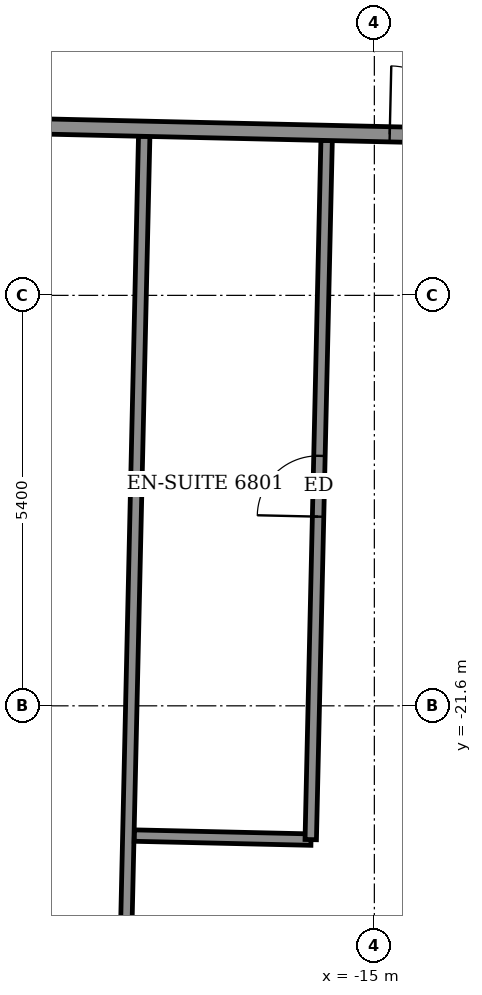
"""IFC4 building model, lengths in metres.
Left out: names, types, materials, properties, quantities, classifications, styles, units other than length and angle.
Written with IfcOpenShell. Run it as: python <this file> out.ifc"""

import sys

from ifc_helpers import new_model, si_unit, direction, frame, frame_2d, origin, place, context, subcontext, project, spatial, rectangle, extrude, element, fill, save


model = new_model("IFC4")
c1 = context("Model", 3, precision=1e-05, world=origin(), true_north=direction((0.0, 1.0)))
c2 = subcontext(c1, "Body", "Model", "MODEL_VIEW")
j1 = project(units=[si_unit("LENGTHUNIT", "METRE"), si_unit("PLANEANGLEUNIT", "RADIAN")], contexts=[c1])
p1 = place(None, origin())
s1 = spatial("IfcSite", under=j1, at=p1, CompositionType="ELEMENT")
p2 = place(p1, origin())
s2 = spatial("IfcBuilding", under=s1, at=p2, CompositionType="ELEMENT")
p3 = place(p2, frame((0.0, 0.0, 268.1)))
s3 = spatial("IfcBuildingStorey", under=s2, at=p3, CompositionType="ELEMENT", Elevation=268.1)
p4 = place(p3, frame((-18.309, -26.505, 0.0), z_axis=(0.0, 0.0, 1.0), x_axis=(0.022661475803, 0.999743195783, 0.0)))
e1 = element("IfcWall", 1, at=p4, inside=s3, PredefinedType="PARTITIONING", context=c2, shape_type="SweptSolid", body=[
    extrude(rectangle(XDim=12.4, YDim=0.15, at=frame_2d((6.2, 0.0))), origin(), (0.0, 0.0, 1.0), 2.55),
])
p5 = place(p3, frame((-18.157, -23.307, 0.0), z_axis=(0.0, 0.0, 1.0), x_axis=(0.999737862264, -0.022895561926, 0.0)))
e2 = element("IfcWall", 2, at=p5, inside=s3, PredefinedType="PARTITIONING", context=c2, shape_type="SweptSolid", body=[
    extrude(rectangle(XDim=2.324, YDim=0.15, at=frame_2d((1.162, 0.0))), origin(), (0.0, 0.0, 1.0), 3.05),
])
p6 = place(p3, frame((-15.837, -23.36, 0.0), z_axis=(0.0, 0.0, 1.0), x_axis=(0.02271477479, 0.999741986218, 0.0)))
e3 = element("IfcWall", 3, at=p6, inside=s3, PredefinedType="PARTITIONING", context=c2, shape_type="SweptSolid", body=[
    extrude(rectangle(XDim=9.2, YDim=0.15, at=frame_2d((4.6, 0.0))), origin(), (0.0, 0.0, 1.0), 3.05),
])
p7 = place(p6, frame((4.25, 0.0, 0.0)))
e4 = element("IfcOpeningElement", 4, at=p7, cuts=e3, PredefinedType="OPENING", context=c2, shape_type="SweptSolid", body=[
    extrude(rectangle(XDim=0.8, YDim=2.1, at=frame_2d((0.4, 1.05))), frame((0.0, 0.085, 0.0), z_axis=(0.0, -1.0, 0.0), x_axis=(1.0, 0.0, 0.0)), (0.0, 0.0, 1.0), 0.17),
])
p8 = place(p3, frame((-25.12, -13.847, 0.0), z_axis=(0.0, 0.0, 1.0), x_axis=(0.999742852445, -0.022676617578, 0.0)))
e5 = element("IfcWall", 5, at=p8, inside=s3, PredefinedType="PARTITIONING", context=c2, shape_type="SweptSolid", body=[
    extrude(rectangle(XDim=52.873, YDim=0.2, at=frame_2d((26.437, 0.0))), origin(), (0.0, 0.0, 1.0), 3.05),
])
p9 = place(p8, frame((2.43, 0.0, 0.0)))
e6 = element("IfcOpeningElement", 6, at=p9, cuts=e5, PredefinedType="OPENING", context=c2, shape_type="SweptSolid", body=[
    extrude(rectangle(XDim=1.0, YDim=2.1, at=frame_2d((0.5, 1.05))), frame((0.0, 0.11, 0.0), z_axis=(0.0, -1.0, 0.0), x_axis=(1.0, 0.0, 0.0)), (0.0, 0.0, 1.0), 0.22),
])
p10 = place(p8, frame((10.325, 0.0, 0.0)))
e7 = element("IfcOpeningElement", 7, at=p10, cuts=e5, PredefinedType="OPENING", context=c2, shape_type="SweptSolid", body=[
    extrude(rectangle(XDim=0.9, YDim=2.1, at=frame_2d((0.45, 1.05))), frame((0.0, 0.11, 0.0), z_axis=(0.0, -1.0, 0.0), x_axis=(1.0, 0.0, 0.0)), (0.0, 0.0, 1.0), 0.22),
])
p11 = place(p8, frame((12.575, 0.0, 0.0)))
e8 = element("IfcOpeningElement", 8, at=p11, cuts=e5, PredefinedType="OPENING", context=c2, shape_type="SweptSolid", body=[
    extrude(rectangle(XDim=0.9, YDim=2.1, at=frame_2d((0.45, 1.05))), frame((0.0, 0.11, 0.0), z_axis=(0.0, -1.0, 0.0), x_axis=(1.0, 0.0, 0.0)), (0.0, 0.0, 1.0), 0.22),
])
p12 = place(p8, frame((19.45, 0.0, 0.0)))
e9 = element("IfcOpeningElement", 9, at=p12, cuts=e5, PredefinedType="OPENING", context=c2, shape_type="SweptSolid", body=[
    extrude(rectangle(XDim=0.9, YDim=2.1, at=frame_2d((0.45, 1.05))), frame((0.0, 0.11, 0.0), z_axis=(0.0, -1.0, 0.0), x_axis=(1.0, 0.0, 0.0)), (0.0, 0.0, 1.0), 0.22),
])
p13 = place(p8, frame((21.625, 0.0, 0.0)))
e10 = element("IfcOpeningElement", 10, at=p13, cuts=e5, PredefinedType="OPENING", context=c2, shape_type="SweptSolid", body=[
    extrude(rectangle(XDim=0.9, YDim=2.1, at=frame_2d((0.45, 1.05))), frame((0.0, 0.11, 0.0), z_axis=(0.0, -1.0, 0.0), x_axis=(1.0, 0.0, 0.0)), (0.0, 0.0, 1.0), 0.22),
])
p14 = place(p8, frame((28.575, 0.0, 0.0)))
e11 = element("IfcOpeningElement", 11, at=p14, cuts=e5, PredefinedType="OPENING", context=c2, shape_type="SweptSolid", body=[
    extrude(rectangle(XDim=0.9, YDim=2.1, at=frame_2d((0.45, 1.05))), frame((0.0, 0.11, 0.0), z_axis=(0.0, -1.0, 0.0), x_axis=(1.0, 0.0, 0.0)), (0.0, 0.0, 1.0), 0.22),
])
p15 = place(p8, frame((30.875, 0.0, 0.0)))
e12 = element("IfcOpeningElement", 12, at=p15, cuts=e5, PredefinedType="OPENING", context=c2, shape_type="SweptSolid", body=[
    extrude(rectangle(XDim=0.9, YDim=2.1, at=frame_2d((0.45, 1.05))), frame((0.0, 0.11, 0.0), z_axis=(0.0, -1.0, 0.0), x_axis=(1.0, 0.0, 0.0)), (0.0, 0.0, 1.0), 0.22),
])
p16 = place(p8, frame((38.175, 0.0, 0.0)))
e13 = element("IfcOpeningElement", 13, at=p16, cuts=e5, PredefinedType="OPENING", context=c2, shape_type="SweptSolid", body=[
    extrude(rectangle(XDim=0.9, YDim=2.1, at=frame_2d((0.45, 1.05))), frame((0.0, 0.11, 0.0), z_axis=(0.0, -1.0, 0.0), x_axis=(1.0, 0.0, 0.0)), (0.0, 0.0, 1.0), 0.22),
])
p17 = place(p8, frame((40.675, 0.0, 0.0)))
e14 = element("IfcOpeningElement", 14, at=p17, cuts=e5, PredefinedType="OPENING", context=c2, shape_type="SweptSolid", body=[
    extrude(rectangle(XDim=0.9, YDim=2.1, at=frame_2d((0.45, 1.05))), frame((0.0, 0.11, 0.0), z_axis=(0.0, -1.0, 0.0), x_axis=(1.0, 0.0, 0.0)), (0.0, 0.0, 1.0), 0.22),
])
p18 = place(p8, frame((50.561, 0.0, 0.0)))
e15 = element("IfcOpeningElement", 15, at=p18, cuts=e5, PredefinedType="OPENING", context=c2, shape_type="SweptSolid", body=[
    extrude(rectangle(XDim=1.0, YDim=2.1, at=frame_2d((0.5, 1.05))), frame((0.0, 0.11, 0.0), z_axis=(0.0, -1.0, 0.0), x_axis=(1.0, 0.0, 0.0)), (0.0, 0.0, 1.0), 0.22),
])
p19 = place(p8, frame((45.6, 0.0, 0.0)))
e16 = element("IfcOpeningElement", 16, at=p19, cuts=e5, PredefinedType="OPENING", context=c2, shape_type="SweptSolid", body=[
    extrude(rectangle(XDim=0.9, YDim=2.1, at=frame_2d((0.45, 1.05))), frame((0.0, 0.11, 0.0), z_axis=(0.0, -1.0, 0.0), x_axis=(1.0, 0.0, 0.0)), (0.0, 0.0, 1.0), 0.22),
])
p20 = place(p10, origin())
e17 = element("IfcDoor", 17, at=p20, inside=s3, OperationType="SINGLE_SWING_LEFT", PredefinedType="DOOR", context=c2, shape_type="SweptSolid", body=[
    extrude(rectangle(XDim=0.9, YDim=2.1, at=frame_2d((0.45, 1.05))), frame((0.0, 0.025, 0.0), z_axis=(0.0, -1.0, 0.0), x_axis=(1.0, 0.0, 0.0)), (0.0, 0.0, 1.0), 0.05),
])
fill(e7, e17)
p21 = place(p7, origin())
e18 = element("IfcDoor", 18, at=p21, inside=s3, OperationType="SINGLE_SWING_LEFT", PredefinedType="DOOR", context=c2, shape_type="SweptSolid", body=[
    extrude(rectangle(XDim=0.8, YDim=2.1, at=frame_2d((0.4, 1.05))), frame((0.0, 0.025, 0.0), z_axis=(0.0, -1.0, 0.0), x_axis=(1.0, 0.0, 0.0)), (0.0, 0.0, 1.0), 0.05),
])
fill(e4, e18)
save(model, sys.argv[1])
